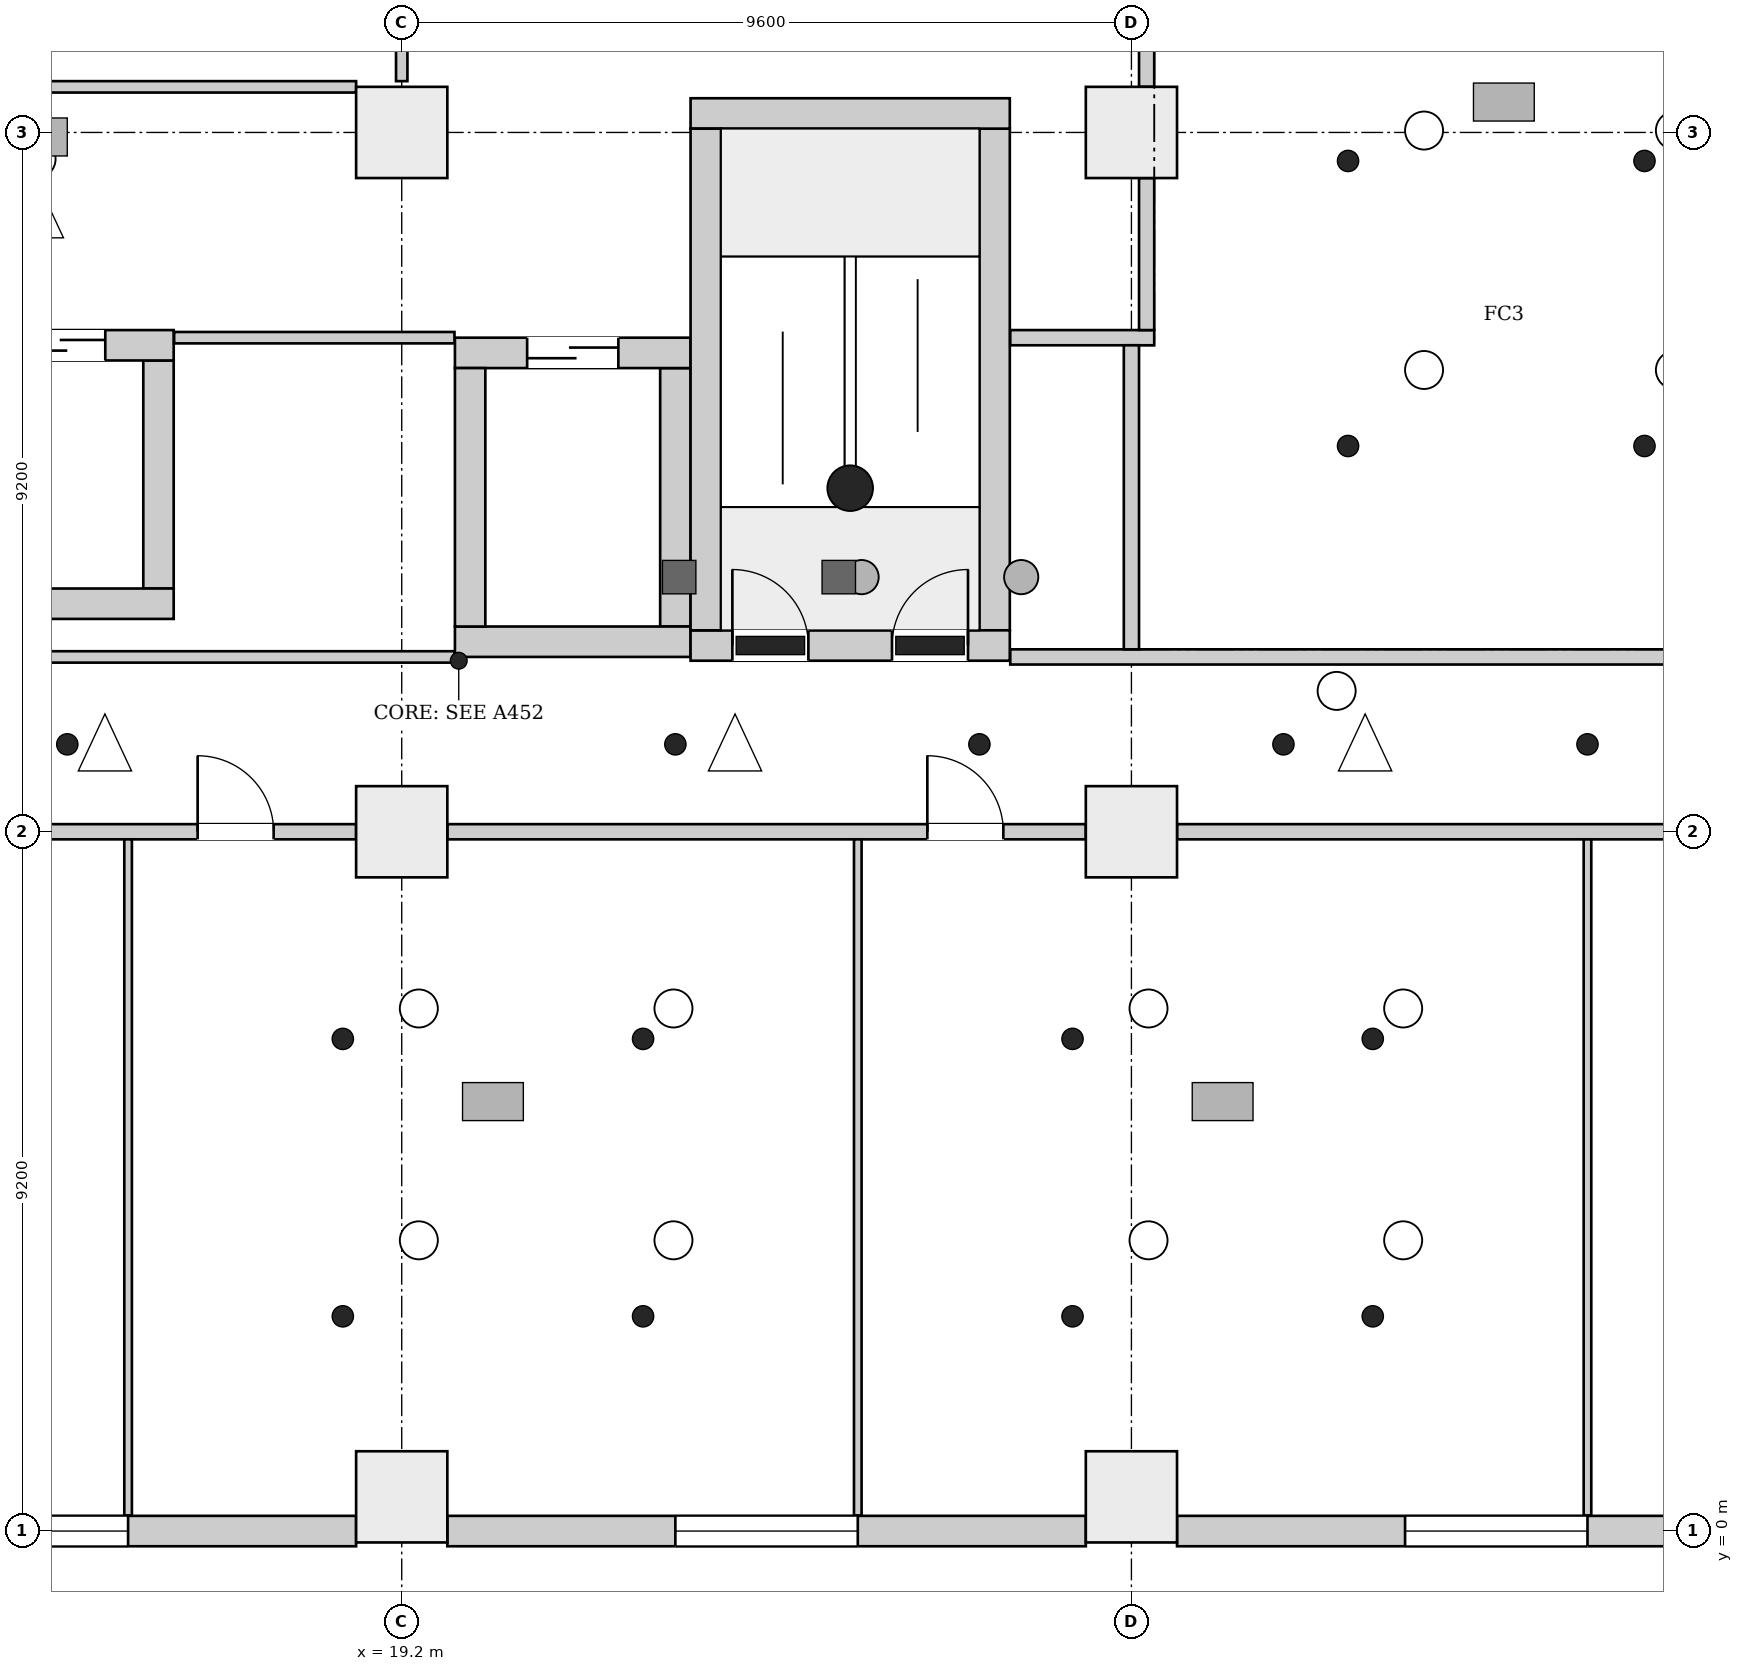
"""IFC4 building model, lengths in metres.
Left out: names, types, materials, properties, quantities, classifications, styles, units other than length and angle.
Written with IfcOpenShell. Run it as: python <this file> out.ifc"""

import sys

from ifc_helpers import new_model, si_unit, direction, frame, frame_2d, origin, origin_2d, place, context, subcontext, project, spatial, rectangle, extrude, element, fill, save


model = new_model("IFC4")
c1 = context("Model", 3, precision=1e-05, world=origin(), true_north=direction((0.0, 1.0)))
c2 = subcontext(c1, "Body", "Model", "MODEL_VIEW")
j1 = project(units=[si_unit("LENGTHUNIT", "METRE"), si_unit("PLANEANGLEUNIT", "RADIAN")], contexts=[c1])
p1 = place(None, origin())
s1 = spatial("IfcSite", under=j1, at=p1, CompositionType="ELEMENT")
p2 = place(p1, origin())
s2 = spatial("IfcBuilding", under=s1, at=p2, CompositionType="ELEMENT")
p3 = place(p2, frame((0.0, 0.0, 14.2)))
s3 = spatial("IfcBuildingStorey", under=s2, at=p3, CompositionType="ELEMENT", Elevation=14.2)
p4 = place(p3, frame((23.0, 11.65, 0.0), z_axis=(0.0, 0.0, 1.0), x_axis=(1.0, 0.0, 0.0)))
e1 = element("IfcWall", 1, at=p4, inside=s3, PredefinedType="SHEAR", context=c2, shape_type="SweptSolid", body=[
    extrude(rectangle(XDim=4.2, YDim=0.4, at=frame_2d((2.1, 0.0))), origin(), (0.0, 0.0, 1.0), 7.5),
])
p5 = place(p4, frame((0.55, 0.0, 0.0)))
e2 = element("IfcOpeningElement", 2, at=p5, cuts=e1, PredefinedType="OPENING", context=c2, shape_type="SweptSolid", body=[
    extrude(rectangle(XDim=1.0, YDim=2.1, at=frame_2d((0.5, 1.05))), frame((0.0, 0.21, 0.0), z_axis=(0.0, -1.0, 0.0), x_axis=(1.0, 0.0, 0.0)), (0.0, 0.0, 1.0), 0.42),
])
p6 = place(p4, frame((2.65, 0.0, 0.0)))
e3 = element("IfcOpeningElement", 3, at=p6, cuts=e1, PredefinedType="OPENING", context=c2, shape_type="SweptSolid", body=[
    extrude(rectangle(XDim=1.0, YDim=2.1, at=frame_2d((0.5, 1.05))), frame((0.0, 0.21, 0.0), z_axis=(0.0, -1.0, 0.0), x_axis=(1.0, 0.0, 0.0)), (0.0, 0.0, 1.0), 0.42),
])
p7 = place(p3, frame((23.0, 18.65, 0.0), z_axis=(0.0, 0.0, 1.0), x_axis=(1.0, 0.0, 0.0)))
e4 = element("IfcWall", 4, at=p7, inside=s3, PredefinedType="SHEAR", context=c2, shape_type="SweptSolid", body=[
    extrude(rectangle(XDim=4.2, YDim=0.4, at=frame_2d((2.1, 0.0))), origin(), (0.0, 0.0, 1.0), 7.5),
])
for number, where, z_axis, x_axis in (
    (5, (23.2, 11.85, 0.0), (0.0, 0.0, 1.0), (0.0, 1.0, 0.0)),
    (6, (27.0, 11.85, 0.0), (0.0, 0.0, 1.0), (0.0, 1.0, 0.0)),
):
    element("IfcWall", number, at=place(p3, frame(where, z_axis=z_axis, x_axis=x_axis)), inside=s3, PredefinedType="SHEAR", context=c2, shape_type="SweptSolid", body=[
        extrude(rectangle(XDim=6.6, YDim=0.4, at=frame_2d((3.3, 0.0))), origin(), (0.0, 0.0, 1.0), 7.5),
    ])
p8 = place(p3, frame((13.3, 12.2, 0.0), z_axis=(0.0, 0.0, 1.0), x_axis=(1.0, 0.0, 0.0)))
e7 = element("IfcWall", 7, at=p8, inside=s3, PredefinedType="SHEAR", context=c2, shape_type="SweptSolid", body=[
    extrude(rectangle(XDim=2.9, YDim=0.4, at=frame_2d((1.45, 0.0))), origin(), (0.0, 0.0, 1.0), 7.5),
])
p9 = place(p3, frame((13.3, 15.6, 0.0), z_axis=(0.0, 0.0, 1.0), x_axis=(1.0, 0.0, 0.0)))
e8 = element("IfcWall", 8, at=p9, inside=s3, PredefinedType="SHEAR", context=c2, shape_type="SweptSolid", body=[
    extrude(rectangle(XDim=2.9, YDim=0.4, at=frame_2d((1.45, 0.0))), origin(), (0.0, 0.0, 1.0), 7.5),
])
p10 = place(p9, frame((0.9, 0.0, 0.0)))
e9 = element("IfcOpeningElement", 9, at=p10, cuts=e8, PredefinedType="OPENING", context=c2, shape_type="SweptSolid", body=[
    extrude(rectangle(XDim=1.1, YDim=2.1, at=frame_2d((0.55, 1.05))), frame((0.0, 0.21, 0.0), z_axis=(0.0, -1.0, 0.0), x_axis=(1.0, 0.0, 0.0)), (0.0, 0.0, 1.0), 0.42),
])
p11 = place(p3, frame((16.0, 12.4, 0.0), z_axis=(0.0, 0.0, 1.0), x_axis=(0.0, 1.0, 0.0)))
e10 = element("IfcWall", 10, at=p11, inside=s3, PredefinedType="SHEAR", context=c2, shape_type="SweptSolid", body=[
    extrude(rectangle(XDim=3.0, YDim=0.4, at=frame_2d((1.5, 0.0))), origin(), (0.0, 0.0, 1.0), 7.5),
])
p12 = place(p3, frame((19.9, 11.7, 0.0), z_axis=(0.0, 0.0, 1.0), x_axis=(1.0, 0.0, 0.0)))
e11 = element("IfcWall", 11, at=p12, inside=s3, PredefinedType="SHEAR", context=c2, shape_type="SweptSolid", body=[
    extrude(rectangle(XDim=3.1, YDim=0.4, at=frame_2d((1.55, 0.0))), origin(), (0.0, 0.0, 1.0), 7.5),
])
p13 = place(p3, frame((19.9, 15.5, 0.0), z_axis=(0.0, 0.0, 1.0), x_axis=(1.0, 0.0, 0.0)))
e12 = element("IfcWall", 12, at=p13, inside=s3, PredefinedType="SHEAR", context=c2, shape_type="SweptSolid", body=[
    extrude(rectangle(XDim=3.1, YDim=0.4, at=frame_2d((1.55, 0.0))), origin(), (0.0, 0.0, 1.0), 7.5),
])
p14 = place(p13, frame((0.95, 0.0, 0.0)))
e13 = element("IfcOpeningElement", 13, at=p14, cuts=e12, PredefinedType="OPENING", context=c2, shape_type="SweptSolid", body=[
    extrude(rectangle(XDim=1.2, YDim=2.1, at=frame_2d((0.6, 1.05))), frame((0.0, 0.21, 0.0), z_axis=(0.0, -1.0, 0.0), x_axis=(1.0, 0.0, 0.0)), (0.0, 0.0, 1.0), 0.42),
])
for number, where, z_axis, x_axis in (
    (14, (20.1, 11.9, 0.0), (0.0, 0.0, 1.0), (0.0, 1.0, 0.0)),
    (15, (22.8, 11.9, 0.0), (0.0, 0.0, 1.0), (0.0, 1.0, 0.0)),
):
    element("IfcWall", number, at=place(p3, frame(where, z_axis=z_axis, x_axis=x_axis)), inside=s3, PredefinedType="SHEAR", context=c2, shape_type="SweptSolid", body=[
        extrude(rectangle(XDim=3.4, YDim=0.4, at=frame_2d((1.7, 0.0))), origin(), (0.0, 0.0, 1.0), 7.5),
    ])
for number, where, z_axis, x_axis in (
    (16, (19.2, 0.45, 0.0), (0.0, 0.0, 1.0), (1.0, 0.0, 0.0)),
    (17, (28.8, 0.45, 0.0), (0.0, 0.0, 1.0), (1.0, 0.0, 0.0)),
    (18, (19.2, 9.2, 0.0), (0.0, 0.0, 1.0), (1.0, 0.0, 0.0)),
    (19, (28.8, 9.2, 0.0), (0.0, 0.0, 1.0), (1.0, 0.0, 0.0)),
    (20, (19.2, 18.4, 0.0), (0.0, 0.0, 1.0), (1.0, 0.0, 0.0)),
    (21, (28.8, 18.4, 0.0), (0.0, 0.0, 1.0), (1.0, 0.0, 0.0)),
):
    element("IfcColumn", number, at=place(p3, frame(where, z_axis=z_axis, x_axis=x_axis)), inside=s3, PredefinedType="COLUMN", context=c2, shape_type="SweptSolid", body=[
        extrude(rectangle(XDim=1.2, YDim=1.2, at=origin_2d()), origin(), (0.0, 0.0, 1.0), 7.5),
    ])
p15 = place(p3, frame((10.2, 0.0, 0.0), z_axis=(0.0, 0.0, 1.0), x_axis=(1.0, 0.0, 0.0)))
e22 = element("IfcWall", 22, at=p15, inside=s3, PredefinedType="ELEMENTEDWALL", context=c2, shape_type="SweptSolid", body=[
    extrude(rectangle(XDim=8.4, YDim=0.4, at=frame_2d((4.2, 0.0))), origin(), (0.0, 0.0, 1.0), 7.15),
])
p16 = place(p15, frame((3.0, 0.0, 1.0)))
e23 = element("IfcOpeningElement", 23, at=p16, cuts=e22, PredefinedType="OPENING", context=c2, shape_type="SweptSolid", body=[
    extrude(rectangle(XDim=2.4, YDim=2.2, at=frame_2d((1.2, 1.1))), frame((0.0, 0.21, 0.0), z_axis=(0.0, -1.0, 0.0), x_axis=(1.0, 0.0, 0.0)), (0.0, 0.0, 1.0), 0.42),
])
p17 = place(p3, frame((19.8, 0.0, 0.0), z_axis=(0.0, 0.0, 1.0), x_axis=(1.0, 0.0, 0.0)))
e24 = element("IfcWall", 24, at=p17, inside=s3, PredefinedType="ELEMENTEDWALL", context=c2, shape_type="SweptSolid", body=[
    extrude(rectangle(XDim=8.4, YDim=0.4, at=frame_2d((4.2, 0.0))), origin(), (0.0, 0.0, 1.0), 7.15),
])
p18 = place(p17, frame((3.0, 0.0, 1.0)))
e25 = element("IfcOpeningElement", 25, at=p18, cuts=e24, PredefinedType="OPENING", context=c2, shape_type="SweptSolid", body=[
    extrude(rectangle(XDim=2.4, YDim=2.2, at=frame_2d((1.2, 1.1))), frame((0.0, 0.21, 0.0), z_axis=(0.0, -1.0, 0.0), x_axis=(1.0, 0.0, 0.0)), (0.0, 0.0, 1.0), 0.42),
])
p19 = place(p3, frame((29.4, 0.0, 0.0), z_axis=(0.0, 0.0, 1.0), x_axis=(1.0, 0.0, 0.0)))
e26 = element("IfcWall", 26, at=p19, inside=s3, PredefinedType="ELEMENTEDWALL", context=c2, shape_type="SweptSolid", body=[
    extrude(rectangle(XDim=8.4, YDim=0.4, at=frame_2d((4.2, 0.0))), origin(), (0.0, 0.0, 1.0), 7.15),
])
p20 = place(p19, frame((3.0, 0.0, 1.0)))
e27 = element("IfcOpeningElement", 27, at=p20, cuts=e26, PredefinedType="OPENING", context=c2, shape_type="SweptSolid", body=[
    extrude(rectangle(XDim=2.4, YDim=2.2, at=frame_2d((1.2, 1.1))), frame((0.0, 0.21, 0.0), z_axis=(0.0, -1.0, 0.0), x_axis=(1.0, 0.0, 0.0)), (0.0, 0.0, 1.0), 0.42),
])
p21 = place(p3, frame((10.2, 9.2, 0.0), z_axis=(0.0, 0.0, 1.0), x_axis=(1.0, 0.0, 0.0)))
e28 = element("IfcWall", 28, at=p21, inside=s3, PredefinedType="PARTITIONING", context=c2, shape_type="SweptSolid", body=[
    extrude(rectangle(XDim=8.4, YDim=0.2, at=frame_2d((4.2, 0.0))), origin(), (0.0, 0.0, 1.0), 6.75),
])
p22 = place(p21, frame((2.285, 0.0, 0.0)))
e29 = element("IfcOpeningElement", 29, at=p22, cuts=e28, PredefinedType="OPENING", context=c2, shape_type="SweptSolid", body=[
    extrude(rectangle(XDim=1.0, YDim=2.1, at=frame_2d((0.5, 1.05))), frame((0.0, 0.11, 0.0), z_axis=(0.0, -1.0, 0.0), x_axis=(1.0, 0.0, 0.0)), (0.0, 0.0, 1.0), 0.22),
])
p23 = place(p21, frame((6.315, 0.0, 0.0)))
e30 = element("IfcOpeningElement", 30, at=p23, cuts=e28, PredefinedType="OPENING", context=c2, shape_type="SweptSolid", body=[
    extrude(rectangle(XDim=1.0, YDim=2.1, at=frame_2d((0.5, 1.05))), frame((0.0, 0.11, 0.0), z_axis=(0.0, -1.0, 0.0), x_axis=(1.0, 0.0, 0.0)), (0.0, 0.0, 1.0), 0.22),
])
p24 = place(p3, frame((10.2, 19.0, 0.0), z_axis=(0.0, 0.0, 1.0), x_axis=(1.0, 0.0, 0.0)))
e31 = element("IfcWall", 31, at=p24, inside=s3, PredefinedType="PARTITIONING", context=c2, shape_type="SweptSolid", body=[
    extrude(rectangle(XDim=8.4, YDim=0.15, at=frame_2d((4.2, 0.0))), origin(), (0.0, 0.0, 1.0), 7.15),
])
p25 = place(p3, frame((10.325, 11.5, 0.0), z_axis=(0.0, 0.0, 1.0), x_axis=(1.0, 0.0, 0.0)))
e32 = element("IfcWall", 32, at=p25, inside=s3, PredefinedType="PARTITIONING", context=c2, shape_type="SweptSolid", body=[
    extrude(rectangle(XDim=9.569, YDim=0.15, at=frame_2d((4.785, 0.0))), origin(), (0.0, 0.0, 1.0), 7.15),
])
p26 = place(p3, frame((15.6, 0.206, 0.0), z_axis=(0.0, 0.0, 1.0), x_axis=(0.0, 1.0, 0.0)))
e33 = element("IfcWall", 33, at=p26, inside=s3, PredefinedType="PARTITIONING", context=c2, shape_type="SweptSolid", body=[
    extrude(rectangle(XDim=8.894, YDim=0.1, at=frame_2d((4.447, 0.0))), origin(), (0.0, 0.0, 1.0), 7.15),
])
p27 = place(p3, frame((16.206, 15.7, 0.0), z_axis=(0.0, 0.0, 1.0), x_axis=(1.0, 0.0, 0.0)))
e34 = element("IfcWall", 34, at=p27, inside=s3, PredefinedType="PARTITIONING", context=c2, shape_type="SweptSolid", body=[
    extrude(rectangle(XDim=3.688, YDim=0.15, at=frame_2d((1.844, 0.0))), origin(), (0.0, 0.0, 1.0), 7.15),
])
p28 = place(p3, frame((19.2, 19.075, 0.0), z_axis=(0.0, 0.0, 1.0), x_axis=(0.0, 1.0, 0.0)))
e35 = element("IfcWall", 35, at=p28, inside=s3, PredefinedType="PARTITIONING", context=c2, shape_type="SweptSolid", body=[
    extrude(rectangle(XDim=1.65, YDim=0.15, at=frame_2d((0.825, 0.0))), origin(), (0.0, 0.0, 1.0), 6.75),
])
p29 = place(p3, frame((19.8, 9.2, 0.0), z_axis=(0.0, 0.0, 1.0), x_axis=(1.0, 0.0, 0.0)))
e36 = element("IfcWall", 36, at=p29, inside=s3, PredefinedType="PARTITIONING", context=c2, shape_type="SweptSolid", body=[
    extrude(rectangle(XDim=8.4, YDim=0.2, at=frame_2d((4.2, 0.0))), origin(), (0.0, 0.0, 1.0), 6.75),
])
p30 = place(p29, frame((6.315, 0.0, 0.0)))
e37 = element("IfcOpeningElement", 37, at=p30, cuts=e36, PredefinedType="OPENING", context=c2, shape_type="SweptSolid", body=[
    extrude(rectangle(XDim=1.0, YDim=2.1, at=frame_2d((0.5, 1.05))), frame((0.0, 0.11, 0.0), z_axis=(0.0, -1.0, 0.0), x_axis=(1.0, 0.0, 0.0)), (0.0, 0.0, 1.0), 0.22),
])
p31 = place(p3, frame((25.2, 0.206, 0.0), z_axis=(0.0, 0.0, 1.0), x_axis=(0.0, 1.0, 0.0)))
e38 = element("IfcWall", 38, at=p31, inside=s3, PredefinedType="PARTITIONING", context=c2, shape_type="SweptSolid", body=[
    extrude(rectangle(XDim=8.894, YDim=0.1, at=frame_2d((4.447, 0.0))), origin(), (0.0, 0.0, 1.0), 7.15),
])
p32 = place(p3, frame((27.206, 11.5, 0.0), z_axis=(0.0, 0.0, 1.0), x_axis=(1.0, 0.0, 0.0)))
e39 = element("IfcWall", 39, at=p32, inside=s3, PredefinedType="PARTITIONING", context=c2, shape_type="SweptSolid", body=[
    extrude(rectangle(XDim=26.494, YDim=0.2, at=frame_2d((13.247, 0.0))), origin(), (0.0, 0.0, 1.0), 7.15),
])
p33 = place(p3, frame((27.206, 15.7, 0.0), z_axis=(0.0, 0.0, 1.0), x_axis=(1.0, 0.0, 0.0)))
e40 = element("IfcWall", 40, at=p33, inside=s3, PredefinedType="PARTITIONING", context=c2, shape_type="SweptSolid", body=[
    extrude(rectangle(XDim=1.894, YDim=0.2, at=frame_2d((0.947, 0.0))), origin(), (0.0, 0.0, 1.0), 7.15),
])
p34 = place(p3, frame((28.8, 11.6, 0.0), z_axis=(0.0, 0.0, 1.0), x_axis=(0.0, 1.0, 0.0)))
e41 = element("IfcWall", 41, at=p34, inside=s3, PredefinedType="PARTITIONING", context=c2, shape_type="SweptSolid", body=[
    extrude(rectangle(XDim=4.0, YDim=0.2, at=frame_2d((2.0, 0.0))), origin(), (0.0, 0.0, 1.0), 6.75),
])
p35 = place(p3, frame((29.0, 15.8, 0.0), z_axis=(0.0, 0.0, 1.0), x_axis=(0.0, 1.0, 0.0)))
e42 = element("IfcWall", 42, at=p35, inside=s3, PredefinedType="PARTITIONING", context=c2, shape_type="SweptSolid", body=[
    extrude(rectangle(XDim=2.0, YDim=0.2, at=frame_2d((1.0, 0.0))), origin(), (0.0, 0.0, 1.0), 6.75),
])
p36 = place(p3, frame((29.0, 19.0, 0.0), z_axis=(0.0, 0.0, 1.0), x_axis=(0.0, 1.0, 0.0)))
e43 = element("IfcWall", 43, at=p36, inside=s3, PredefinedType="PARTITIONING", context=c2, shape_type="SweptSolid", body=[
    extrude(rectangle(XDim=1.7, YDim=0.2, at=frame_2d((0.85, 0.0))), origin(), (0.0, 0.0, 1.0), 6.75),
])
p37 = place(p3, frame((29.4, 9.2, 0.0), z_axis=(0.0, 0.0, 1.0), x_axis=(1.0, 0.0, 0.0)))
e44 = element("IfcWall", 44, at=p37, inside=s3, PredefinedType="PARTITIONING", context=c2, shape_type="SweptSolid", body=[
    extrude(rectangle(XDim=8.4, YDim=0.2, at=frame_2d((4.2, 0.0))), origin(), (0.0, 0.0, 1.0), 6.75),
])
p38 = place(p3, frame((34.8, 0.206, 0.0), z_axis=(0.0, 0.0, 1.0), x_axis=(0.0, 1.0, 0.0)))
e45 = element("IfcWall", 45, at=p38, inside=s3, PredefinedType="PARTITIONING", context=c2, shape_type="SweptSolid", body=[
    extrude(rectangle(XDim=8.894, YDim=0.1, at=frame_2d((4.447, 0.0))), origin(), (0.0, 0.0, 1.0), 7.15),
])
p39 = place(p16, origin())
e46 = element("IfcWindow", 46, at=p39, inside=s3, PartitioningType="SINGLE_PANEL", PredefinedType="WINDOW", context=c2, shape_type="SweptSolid", body=[
    extrude(rectangle(XDim=2.4, YDim=2.2, at=frame_2d((1.2, 1.1))), frame((0.0, 0.03, 0.0), z_axis=(0.0, -1.0, 0.0), x_axis=(1.0, 0.0, 0.0)), (0.0, 0.0, 1.0), 0.06),
])
fill(e23, e46)
p40 = place(p18, origin())
e47 = element("IfcWindow", 47, at=p40, inside=s3, PartitioningType="SINGLE_PANEL", PredefinedType="WINDOW", context=c2, shape_type="SweptSolid", body=[
    extrude(rectangle(XDim=2.4, YDim=2.2, at=frame_2d((1.2, 1.1))), frame((0.0, 0.03, 0.0), z_axis=(0.0, -1.0, 0.0), x_axis=(1.0, 0.0, 0.0)), (0.0, 0.0, 1.0), 0.06),
])
fill(e25, e47)
p41 = place(p20, origin())
e48 = element("IfcWindow", 48, at=p41, inside=s3, PartitioningType="SINGLE_PANEL", PredefinedType="WINDOW", context=c2, shape_type="SweptSolid", body=[
    extrude(rectangle(XDim=2.4, YDim=2.2, at=frame_2d((1.2, 1.1))), frame((0.0, 0.03, 0.0), z_axis=(0.0, -1.0, 0.0), x_axis=(1.0, 0.0, 0.0)), (0.0, 0.0, 1.0), 0.06),
])
fill(e27, e48)
p42 = place(p5, origin())
e49 = element("IfcDoor", 49, at=p42, inside=s3, OperationType="SINGLE_SWING_RIGHT", PredefinedType="DOOR", context=c2, shape_type="SweptSolid", body=[
    extrude(rectangle(XDim=1.0, YDim=2.1, at=frame_2d((0.5, 1.05))), frame((0.0, 0.025, 0.0), z_axis=(0.0, -1.0, 0.0), x_axis=(1.0, 0.0, 0.0)), (0.0, 0.0, 1.0), 0.05),
])
fill(e2, e49)
p43 = place(p6, origin())
e50 = element("IfcDoor", 50, at=p43, inside=s3, OperationType="SINGLE_SWING_LEFT", PredefinedType="DOOR", context=c2, shape_type="SweptSolid", body=[
    extrude(rectangle(XDim=1.0, YDim=2.1, at=frame_2d((0.5, 1.05))), frame((0.0, 0.025, 0.0), z_axis=(0.0, -1.0, 0.0), x_axis=(1.0, 0.0, 0.0)), (0.0, 0.0, 1.0), 0.05),
])
fill(e3, e50)
p44 = place(p10, origin())
e51 = element("IfcDoor", 51, at=p44, inside=s3, OperationType="DOUBLE_DOOR_SLIDING", PredefinedType="DOOR", context=c2, shape_type="SweptSolid", body=[
    extrude(rectangle(XDim=1.1, YDim=2.1, at=frame_2d((0.55, 1.05))), frame((0.0, 0.025, 0.0), z_axis=(0.0, -1.0, 0.0), x_axis=(1.0, 0.0, 0.0)), (0.0, 0.0, 1.0), 0.05),
])
fill(e9, e51)
p45 = place(p14, origin())
e52 = element("IfcDoor", 52, at=p45, inside=s3, OperationType="DOUBLE_DOOR_SLIDING", PredefinedType="DOOR", context=c2, shape_type="SweptSolid", body=[
    extrude(rectangle(XDim=1.2, YDim=2.1, at=frame_2d((0.6, 1.05))), frame((0.0, 0.025, 0.0), z_axis=(0.0, -1.0, 0.0), x_axis=(1.0, 0.0, 0.0)), (0.0, 0.0, 1.0), 0.05),
])
fill(e13, e52)
p46 = place(p23, origin())
e53 = element("IfcDoor", 53, at=p46, inside=s3, OperationType="SINGLE_SWING_LEFT", PredefinedType="DOOR", context=c2, shape_type="SweptSolid", body=[
    extrude(rectangle(XDim=1.0, YDim=2.1, at=frame_2d((0.5, 1.05))), frame((0.0, 0.025, 0.0), z_axis=(0.0, -1.0, 0.0), x_axis=(1.0, 0.0, 0.0)), (0.0, 0.0, 1.0), 0.05),
])
fill(e30, e53)
p47 = place(p30, origin())
e54 = element("IfcDoor", 54, at=p47, inside=s3, OperationType="SINGLE_SWING_LEFT", PredefinedType="DOOR", context=c2, shape_type="SweptSolid", body=[
    extrude(rectangle(XDim=1.0, YDim=2.1, at=frame_2d((0.5, 1.05))), frame((0.0, 0.025, 0.0), z_axis=(0.0, -1.0, 0.0), x_axis=(1.0, 0.0, 0.0)), (0.0, 0.0, 1.0), 0.05),
])
fill(e37, e54)
save(model, sys.argv[1])
